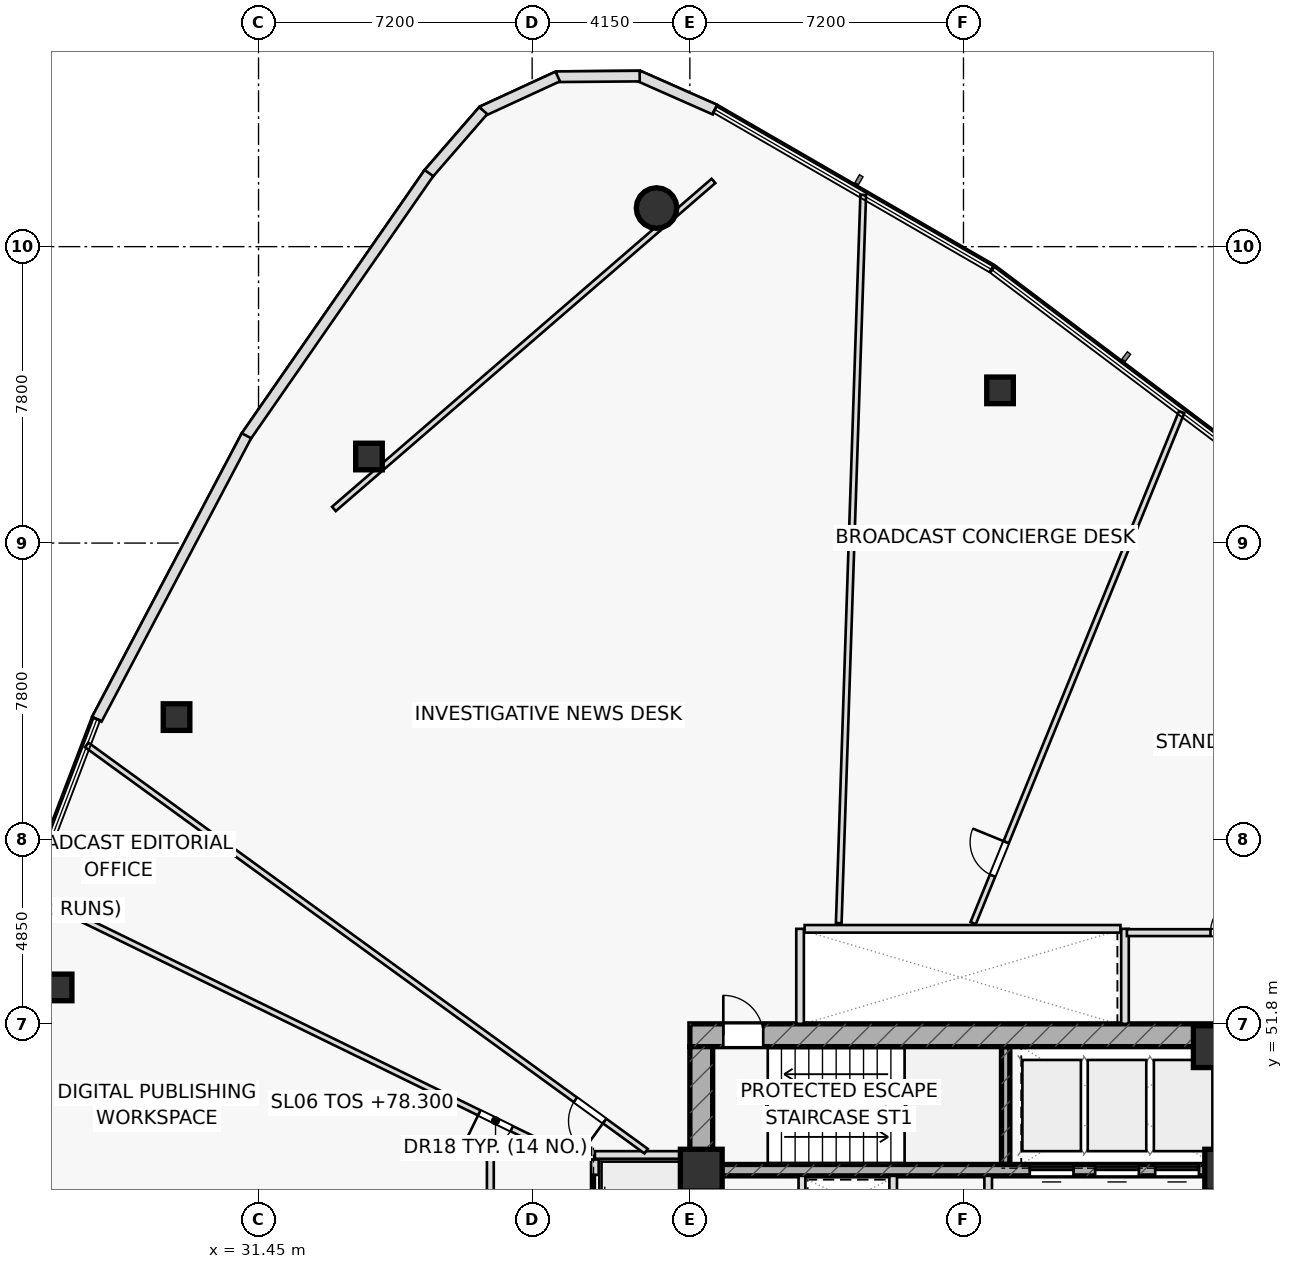
"""IFC4 building model, lengths in metres.
Left out: names, types, materials, properties, quantities, classifications, styles, units other than length and angle.
Written with IfcOpenShell. Run it as: python <this file> out.ifc"""

import sys

from ifc_helpers import new_model, si_unit, direction, frame, frame_2d, origin, origin_2d, place, context, subcontext, project, spatial, rectangle, hollow_rectangle, hollow_circle, extrude, element, fill, save


model = new_model("IFC4")
c1 = context("Model", 3, precision=1e-05, world=origin(), true_north=direction((0.0, 1.0)))
c2 = subcontext(c1, "Body", "Model", "MODEL_VIEW")
j1 = project(units=[si_unit("LENGTHUNIT", "METRE"), si_unit("PLANEANGLEUNIT", "RADIAN")], contexts=[c1])
p1 = place(None, origin())
s1 = spatial("IfcSite", under=j1, at=p1, CompositionType="ELEMENT")
p2 = place(p1, origin())
s2 = spatial("IfcBuilding", under=s1, at=p2, CompositionType="ELEMENT")
p3 = place(p2, frame((0.0, 0.0, 78.3)))
s3 = spatial("IfcBuildingStorey", under=s2, at=p3, CompositionType="ELEMENT", Elevation=78.3)
p4 = place(p3, frame((51.11, 48.1, 0.0), z_axis=(0.0, 0.0, 1.0), x_axis=(0.0, 1.0, 0.0)))
e1 = element("IfcWall", 1, at=p4, inside=s3, PredefinedType="SHEAR", context=c2, shape_type="SweptSolid", body=[
    extrude(rectangle(XDim=3.1, YDim=0.22, at=frame_2d((1.55, 0.0))), origin(), (0.0, 0.0, 1.0), 3.6),
])
p5 = place(p3, frame((42.8, 51.5, 0.0), z_axis=(0.0, 0.0, 1.0), x_axis=(1.0, 0.0, 0.0)))
e2 = element("IfcWall", 2, at=p5, inside=s3, PredefinedType="SHEAR", context=c2, shape_type="SweptSolid", body=[
    extrude(rectangle(XDim=14.4, YDim=0.6, at=frame_2d((7.2, 0.0))), origin(), (0.0, 0.0, 1.0), 3.6),
])
p6 = place(p5, frame((0.88, 0.0, 0.0)))
e3 = element("IfcOpeningElement", 3, at=p6, cuts=e2, PredefinedType="OPENING", context=c2, shape_type="SweptSolid", body=[
    extrude(rectangle(XDim=1.05, YDim=2.2, at=frame_2d((0.525, 1.1))), frame((0.0, 0.31, 0.0), z_axis=(0.0, -1.0, 0.0), x_axis=(1.0, 0.0, 0.0)), (0.0, 0.0, 1.0), 0.62),
])
p7 = place(p3, frame((43.1, 38.8, 0.0), z_axis=(0.0, 0.0, 1.0), x_axis=(0.0, 1.0, 0.0)))
e4 = element("IfcWall", 4, at=p7, inside=s3, PredefinedType="SHEAR", context=c2, shape_type="SweptSolid", body=[
    extrude(rectangle(XDim=12.4, YDim=0.6, at=frame_2d((6.2, 0.0))), origin(), (0.0, 0.0, 1.0), 3.6),
])
p8 = place(p3, frame((43.4, 47.95, 0.0), z_axis=(0.0, 0.0, 1.0), x_axis=(1.0, 0.0, 0.0)))
e5 = element("IfcWall", 5, at=p8, inside=s3, PredefinedType="SHEAR", context=c2, shape_type="SweptSolid", body=[
    extrude(rectangle(XDim=13.2, YDim=0.3, at=frame_2d((6.6, 0.0))), origin(), (0.0, 0.0, 1.0), 3.6),
])
p9 = place(p8, frame((8.345, 0.0, 0.0)))
e6 = element("IfcOpeningElement", 6, at=p9, cuts=e5, PredefinedType="OPENING", context=c2, shape_type="SweptSolid", body=[
    extrude(rectangle(XDim=1.15, YDim=2.2, at=frame_2d((0.575, 1.1))), frame((0.0, 0.16, 0.0), z_axis=(0.0, -1.0, 0.0), x_axis=(1.0, 0.0, 0.0)), (0.0, 0.0, 1.0), 0.32),
])
p10 = place(p8, frame((10.065, 0.0, 0.0)))
e7 = element("IfcOpeningElement", 7, at=p10, cuts=e5, PredefinedType="OPENING", context=c2, shape_type="SweptSolid", body=[
    extrude(rectangle(XDim=1.15, YDim=2.2, at=frame_2d((0.575, 1.1))), frame((0.0, 0.16, 0.0), z_axis=(0.0, -1.0, 0.0), x_axis=(1.0, 0.0, 0.0)), (0.0, 0.0, 1.0), 0.32),
])
p11 = place(p8, frame((11.645, 0.0, 0.0)))
e8 = element("IfcOpeningElement", 8, at=p11, cuts=e5, PredefinedType="OPENING", context=c2, shape_type="SweptSolid", body=[
    extrude(rectangle(XDim=1.15, YDim=2.2, at=frame_2d((0.575, 1.1))), frame((0.0, 0.16, 0.0), z_axis=(0.0, -1.0, 0.0), x_axis=(1.0, 0.0, 0.0)), (0.0, 0.0, 1.0), 0.32),
])
for number, where, z_axis, x_axis in (
    (9, (43.1, 47.95, 0.0), (0.0, 0.0, 1.0), (1.0, 0.0, 0.0)),
    (10, (56.9, 47.95, 0.0), (0.0, 0.0, 1.0), (1.0, 0.0, 0.0)),
    (11, (56.6, 51.2, 0.0), (0.0, 0.0, 1.0), (1.0, 0.0, 0.0)),
):
    element("IfcColumn", number, at=place(p3, frame(where, z_axis=z_axis, x_axis=x_axis)), inside=s3, PredefinedType="COLUMN", context=c2, shape_type="SweptSolid", body=[
        extrude(rectangle(XDim=1.1, YDim=1.1, at=origin_2d()), origin(), (0.0, 0.0, 1.0), 3.6),
    ])
p12 = place(p3, frame((41.923, 73.266, 0.0), z_axis=(0.0, 0.0, 1.0), x_axis=(1.0, 0.0, 0.0)))
e12 = element("IfcColumn", 12, at=p12, inside=s3, PredefinedType="COLUMN", context=c2, shape_type="SweptSolid", body=[
    extrude(hollow_circle(Radius=0.533, WallThickness=0.045, at=origin_2d()), origin(), (0.0, 0.0, 1.0), 3.6),
])
for number, where, z_axis, x_axis in (
    (13, (34.356, 66.728, 0.0), (0.0, 0.0, 1.0), (1.0, 0.0, 0.0)),
    (14, (29.292, 59.872, 0.0), (0.0, 0.0, 1.0), (1.0, 0.0, 0.0)),
    (15, (26.189, 52.758, 0.0), (0.0, 0.0, 1.0), (1.0, 0.0, 0.0)),
    (16, (50.962, 68.469, 0.0), (0.0, 0.0, 1.0), (1.0, 0.0, 0.0)),
):
    element("IfcColumn", number, at=place(p3, frame(where, z_axis=z_axis, x_axis=x_axis)), inside=s3, PredefinedType="COLUMN", context=c2, shape_type="SweptSolid", body=[
        extrude(hollow_rectangle(XDim=0.7, YDim=0.7, WallThickness=0.04, at=origin_2d()), origin(), (0.0, 0.0, 1.0), 3.6),
    ])
for number, where, z_axis, x_axis in (
    (17, (40.3, 48.35, 0.0), (0.0, 0.0, 1.0), (1.0, 0.0, 0.0)),
    (18, (45.7, 51.8, 0.0), (0.0, 0.0, 1.0), (0.0, 1.0, 0.0)),
    (19, (54.25, 51.8, 0.0), (0.0, 0.0, 1.0), (0.0, 1.0, 0.0)),
):
    element("IfcWall", number, at=place(p3, frame(where, z_axis=z_axis, x_axis=x_axis)), inside=s3, PredefinedType="PARTITIONING", context=c2, shape_type="SweptSolid", body=[
        extrude(rectangle(XDim=2.5, YDim=0.2, at=frame_2d((1.25, 0.0))), origin(), (0.0, 0.0, 1.0), 3.6),
    ])
p13 = place(p3, frame((48.15, 46.55, 0.0), z_axis=(0.0, 0.0, 1.0), x_axis=(0.0, 1.0, 0.0)))
e20 = element("IfcWall", 20, at=p13, inside=s3, PredefinedType="PARTITIONING", context=c2, shape_type="SweptSolid", body=[
    extrude(rectangle(XDim=1.25, YDim=0.2, at=frame_2d((0.625, 0.0))), origin(), (0.0, 0.0, 1.0), 3.6),
])
p14 = place(p3, frame((50.65, 45.05, 0.0), z_axis=(0.0, 0.0, 1.0), x_axis=(0.0, 1.0, 0.0)))
e21 = element("IfcWall", 21, at=p14, inside=s3, PredefinedType="PARTITIONING", context=c2, shape_type="SweptSolid", body=[
    extrude(rectangle(XDim=2.75, YDim=0.2, at=frame_2d((1.375, 0.0))), origin(), (0.0, 0.0, 1.0), 3.6),
])
p15 = place(p3, frame((45.75, 42.2, 0.0), z_axis=(0.0, 0.0, 1.0), x_axis=(0.0, 1.0, 0.0)))
e22 = element("IfcWall", 22, at=p15, inside=s3, PredefinedType="PARTITIONING", context=c2, shape_type="SweptSolid", body=[
    extrude(rectangle(XDim=5.6, YDim=0.18, at=frame_2d((2.8, 0.0))), origin(), (0.0, 0.0, 1.0), 3.6),
])
p16 = place(p15, frame((0.55, 0.0, 0.0)))
e23 = element("IfcOpeningElement", 23, at=p16, cuts=e22, PredefinedType="OPENING", context=c2, shape_type="SweptSolid", body=[
    extrude(rectangle(XDim=0.9, YDim=2.05, at=frame_2d((0.45, 1.025))), frame((0.0, 0.1, 0.0), z_axis=(0.0, -1.0, 0.0), x_axis=(1.0, 0.0, 0.0)), (0.0, 0.0, 1.0), 0.2),
])
p17 = place(p15, frame((2.9, 0.0, 0.0)))
e24 = element("IfcOpeningElement", 24, at=p17, cuts=e22, PredefinedType="OPENING", context=c2, shape_type="SweptSolid", body=[
    extrude(rectangle(XDim=0.85, YDim=2.05, at=frame_2d((0.425, 1.025))), frame((0.0, 0.1, 0.0), z_axis=(0.0, -1.0, 0.0), x_axis=(1.0, 0.0, 0.0)), (0.0, 0.0, 1.0), 0.2),
])
p18 = place(p3, frame((43.421, 73.979, 0.0), z_axis=(0.0, 0.0, 1.0), x_axis=(-0.756659135409, -0.653809569218, 0.0)))
e25 = element("IfcWall", 25, at=p18, inside=s3, PredefinedType="PARTITIONING", context=c2, shape_type="SweptSolid", body=[
    extrude(rectangle(XDim=13.2, YDim=0.15, at=frame_2d((6.6, 0.0))), origin(), (0.0, 0.0, 1.0), 2.975),
])
p19 = place(p3, frame((39.326, 48.45, 0.0), z_axis=(0.0, 0.0, 1.0), x_axis=(-0.898790760356, 0.438377883907, 0.0)))
e26 = element("IfcWall", 26, at=p19, inside=s3, PredefinedType="PARTITIONING", context=c2, shape_type="SweptSolid", body=[
    extrude(rectangle(XDim=15.456, YDim=0.15, at=frame_2d((7.728, 0.0))), origin(), (0.0, 0.0, 1.0), 2.975),
])
p20 = place(p19, frame((1.35, 0.0, 0.0)))
e27 = element("IfcOpeningElement", 27, at=p20, cuts=e26, PredefinedType="OPENING", context=c2, shape_type="SweptSolid", body=[
    extrude(rectangle(XDim=0.95, YDim=2.05, at=frame_2d((0.475, 1.025))), frame((0.0, 0.085, 0.0), z_axis=(0.0, -1.0, 0.0), x_axis=(1.0, 0.0, 0.0)), (0.0, 0.0, 1.0), 0.17),
])
p21 = place(p3, frame((50.255, 54.45, 0.0), z_axis=(0.0, 0.0, 1.0), x_axis=(0.377744353623, 0.92590993261, 0.0)))
e28 = element("IfcWall", 28, at=p21, inside=s3, PredefinedType="PARTITIONING", context=c2, shape_type="SweptSolid", body=[
    extrude(rectangle(XDim=14.522, YDim=0.15, at=frame_2d((7.261, 0.0))), origin(), (0.0, 0.0, 1.0), 2.975),
])
p22 = place(p21, frame((1.35, 0.0, 0.0)))
e29 = element("IfcOpeningElement", 29, at=p22, cuts=e28, PredefinedType="OPENING", context=c2, shape_type="SweptSolid", body=[
    extrude(rectangle(XDim=0.95, YDim=2.05, at=frame_2d((0.475, 1.025))), frame((0.0, 0.085, 0.0), z_axis=(0.0, -1.0, 0.0), x_axis=(1.0, 0.0, 0.0)), (0.0, 0.0, 1.0), 0.17),
])
p23 = place(p3, frame((46.718, 54.45, 0.0), z_axis=(0.0, 0.0, 1.0), x_axis=(0.033591693119, 0.999435639825, 0.0)))
e30 = element("IfcWall", 30, at=p23, inside=s3, PredefinedType="PARTITIONING", context=c2, shape_type="SweptSolid", body=[
    extrude(rectangle(XDim=19.173, YDim=0.15, at=frame_2d((9.586, 0.0))), origin(), (0.0, 0.0, 1.0), 3.025),
])
p24 = place(p3, frame((41.649, 48.45, 0.0), z_axis=(0.0, 0.0, 1.0), x_axis=(-0.809164130734, 0.587582683146, 0.0)))
e31 = element("IfcWall", 31, at=p24, inside=s3, PredefinedType="PARTITIONING", context=c2, shape_type="SweptSolid", body=[
    extrude(rectangle(XDim=18.193, YDim=0.15, at=frame_2d((9.097, 0.0))), origin(), (0.0, 0.0, 1.0), 2.975),
])
p25 = place(p24, frame((1.35, 0.0, 0.0)))
e32 = element("IfcOpeningElement", 32, at=p25, cuts=e31, PredefinedType="OPENING", context=c2, shape_type="SweptSolid", body=[
    extrude(rectangle(XDim=0.95, YDim=2.05, at=frame_2d((0.475, 1.025))), frame((0.0, 0.085, 0.0), z_axis=(0.0, -1.0, 0.0), x_axis=(1.0, 0.0, 0.0)), (0.0, 0.0, 1.0), 0.17),
])
p26 = place(p3, frame((54.3, 54.2, 0.0), z_axis=(0.0, 0.0, 1.0), x_axis=(1.0, 0.0, 0.0)))
e33 = element("IfcWall", 33, at=p26, inside=s3, PredefinedType="PARTITIONING", context=c2, shape_type="SweptSolid", body=[
    extrude(rectangle(XDim=5.35, YDim=0.18, at=frame_2d((2.675, 0.0))), origin(), (0.0, 0.0, 1.0), 2.975),
])
p27 = place(p26, frame((2.2, 0.0, 0.0)))
e34 = element("IfcOpeningElement", 34, at=p27, cuts=e33, PredefinedType="OPENING", context=c2, shape_type="SweptSolid", body=[
    extrude(rectangle(XDim=0.95, YDim=2.05, at=frame_2d((0.475, 1.025))), frame((0.0, 0.1, 0.0), z_axis=(0.0, -1.0, 0.0), x_axis=(1.0, 0.0, 0.0)), (0.0, 0.0, 1.0), 0.2),
])
p28 = place(p3, frame((37.55, 35.75, 0.0), z_axis=(0.0, 0.0, 1.0), x_axis=(0.0, 1.0, 0.0)))
e35 = element("IfcWall", 35, at=p28, inside=s3, PredefinedType="PARTITIONING", context=c2, shape_type="SweptSolid", body=[
    extrude(rectangle(XDim=12.75, YDim=0.18, at=frame_2d((6.375, 0.0))), origin(), (0.0, 0.0, 1.0), 2.975),
])
p29 = place(p28, frame((3.417, 0.0, 0.0)))
e36 = element("IfcOpeningElement", 36, at=p29, cuts=e35, PredefinedType="OPENING", context=c2, shape_type="SweptSolid", body=[
    extrude(rectangle(XDim=0.95, YDim=2.05, at=frame_2d((0.475, 1.025))), frame((0.0, 0.1, 0.0), z_axis=(0.0, -1.0, 0.0), x_axis=(1.0, 0.0, 0.0)), (0.0, 0.0, 1.0), 0.2),
])
p30 = place(p28, frame((8.205, 0.0, 0.0)))
e37 = element("IfcOpeningElement", 37, at=p30, cuts=e35, PredefinedType="OPENING", context=c2, shape_type="SweptSolid", body=[
    extrude(rectangle(XDim=0.95, YDim=2.05, at=frame_2d((0.475, 1.025))), frame((0.0, 0.1, 0.0), z_axis=(0.0, -1.0, 0.0), x_axis=(1.0, 0.0, 0.0)), (0.0, 0.0, 1.0), 0.2),
])
p31 = place(p28, frame((10.687, 0.0, 0.0)))
e38 = element("IfcOpeningElement", 38, at=p31, cuts=e35, PredefinedType="OPENING", context=c2, shape_type="SweptSolid", body=[
    extrude(rectangle(XDim=0.95, YDim=2.05, at=frame_2d((0.475, 1.025))), frame((0.0, 0.1, 0.0), z_axis=(0.0, -1.0, 0.0), x_axis=(1.0, 0.0, 0.0)), (0.0, 0.0, 1.0), 0.2),
])
p32 = place(p3, frame((37.5, 48.45, 0.0), z_axis=(0.0, 0.0, 1.0), x_axis=(1.0, 0.0, 0.0)))
e39 = element("IfcWall", 39, at=p32, inside=s3, PredefinedType="PARTITIONING", context=c2, shape_type="SweptSolid", body=[
    extrude(rectangle(XDim=2.7, YDim=0.18, at=frame_2d((1.35, 0.0))), origin(), (0.0, 0.0, 1.0), 3.6),
])
p33 = place(p3, frame((43.46, 75.856, 0.0), z_axis=(0.0, 0.0, 1.0), x_axis=(-0.914607276656, 0.404343331203, 0.0)))
e40 = element("IfcWall", 40, at=p33, inside=s3, PredefinedType="STANDARD", context=c2, shape_type="SweptSolid", body=[
    extrude(rectangle(XDim=2.197, YDim=0.28, at=frame_2d((1.098, 0.0))), origin(), (0.0, 0.0, 1.0), 3.6),
])
p34 = place(p3, frame((41.479, 76.738, 0.0), z_axis=(0.0, 0.0, 1.0), x_axis=(-0.999968535551, -0.007932711288, 0.0)))
e41 = element("IfcWall", 41, at=p34, inside=s3, PredefinedType="STANDARD", context=c2, shape_type="SweptSolid", body=[
    extrude(rectangle(XDim=2.185, YDim=0.28, at=frame_2d((1.093, 0.0))), origin(), (0.0, 0.0, 1.0), 3.6),
])
p35 = place(p3, frame((39.323, 76.727, 0.0), z_axis=(0.0, 0.0, 1.0), x_axis=(-0.908126107748, -0.418696754735, 0.0)))
e42 = element("IfcWall", 42, at=p35, inside=s3, PredefinedType="STANDARD", context=c2, shape_type="SweptSolid", body=[
    extrude(rectangle(XDim=2.185, YDim=0.28, at=frame_2d((1.092, 0.0))), origin(), (0.0, 0.0, 1.0), 3.6),
])
p36 = place(p3, frame((37.362, 75.83, 0.0), z_axis=(0.0, 0.0, 1.0), x_axis=(-0.655351461556, -0.755324077358, 0.0)))
e43 = element("IfcWall", 43, at=p36, inside=s3, PredefinedType="STANDARD", context=c2, shape_type="SweptSolid", body=[
    extrude(rectangle(XDim=2.208, YDim=0.28, at=frame_2d((1.104, 0.0))), origin(), (0.0, 0.0, 1.0), 3.6),
])
p37 = place(p3, frame((35.934, 74.186, 0.0), z_axis=(0.0, 0.0, 1.0), x_axis=(-0.570377390301, -0.821382756475, 0.0)))
e44 = element("IfcWall", 44, at=p37, inside=s3, PredefinedType="STANDARD", context=c2, shape_type="SweptSolid", body=[
    extrude(rectangle(XDim=8.446, YDim=0.28, at=frame_2d((4.223, 0.0))), origin(), (0.0, 0.0, 1.0), 3.6),
])
p38 = place(p3, frame((31.132, 67.275, 0.0), z_axis=(0.0, 0.0, 1.0), x_axis=(-0.466778115756, -0.884374462912, 0.0)))
e45 = element("IfcWall", 45, at=p38, inside=s3, PredefinedType="STANDARD", context=c2, shape_type="SweptSolid", body=[
    extrude(rectangle(XDim=8.434, YDim=0.28, at=frame_2d((4.217, 0.0))), origin(), (0.0, 0.0, 1.0), 3.6),
])
p39 = place(p3, frame((40.3, 40.02, 0.0), z_axis=(0.0, 0.0, 1.0), x_axis=(0.0, 1.0, 0.0)))
e46 = element("IfcWall", 46, at=p39, inside=s3, PredefinedType="PARTITIONING", context=c2, shape_type="SweptSolid", body=[
    extrude(rectangle(XDim=8.21, YDim=0.2, at=frame_2d((4.105, 0.0))), origin(), (0.0, 0.0, 1.0), 3.6),
])
p40 = place(p39, frame((0.405, 0.0, 0.0)))
e47 = element("IfcOpeningElement", 47, at=p40, cuts=e46, PredefinedType="OPENING", context=c2, shape_type="SweptSolid", body=[
    extrude(rectangle(XDim=1.1, YDim=2.15, at=frame_2d((0.55, 1.075))), frame((0.0, 0.11, 0.0), z_axis=(0.0, -1.0, 0.0), x_axis=(1.0, 0.0, 0.0)), (0.0, 0.0, 1.0), 0.22),
])
p41 = place(p39, frame((2.505, 0.0, 0.0)))
e48 = element("IfcOpeningElement", 48, at=p41, cuts=e46, PredefinedType="OPENING", context=c2, shape_type="SweptSolid", body=[
    extrude(rectangle(XDim=1.1, YDim=2.15, at=frame_2d((0.55, 1.075))), frame((0.0, 0.11, 0.0), z_axis=(0.0, -1.0, 0.0), x_axis=(1.0, 0.0, 0.0)), (0.0, 0.0, 1.0), 0.22),
])
p42 = place(p39, frame((4.605, 0.0, 0.0)))
e49 = element("IfcOpeningElement", 49, at=p42, cuts=e46, PredefinedType="OPENING", context=c2, shape_type="SweptSolid", body=[
    extrude(rectangle(XDim=1.1, YDim=2.15, at=frame_2d((0.55, 1.075))), frame((0.0, 0.11, 0.0), z_axis=(0.0, -1.0, 0.0), x_axis=(1.0, 0.0, 0.0)), (0.0, 0.0, 1.0), 0.22),
])
p43 = place(p39, frame((6.705, 0.0, 0.0)))
e50 = element("IfcOpeningElement", 50, at=p43, cuts=e46, PredefinedType="OPENING", context=c2, shape_type="SweptSolid", body=[
    extrude(rectangle(XDim=1.1, YDim=2.15, at=frame_2d((0.55, 1.075))), frame((0.0, 0.11, 0.0), z_axis=(0.0, -1.0, 0.0), x_axis=(1.0, 0.0, 0.0)), (0.0, 0.0, 1.0), 0.22),
])
p44 = place(p3, frame((45.82, 54.3, 0.0), z_axis=(0.0, 0.0, 1.0), x_axis=(1.0, 0.0, 0.0)))
e51 = element("IfcWall", 51, at=p44, inside=s3, PredefinedType="PARTITIONING", context=c2, shape_type="SweptSolid", body=[
    extrude(rectangle(XDim=8.31, YDim=0.2, at=frame_2d((4.155, 0.0))), origin(), (0.0, 0.0, 1.0), 3.6),
])
p45 = place(p6, origin())
e52 = element("IfcDoor", 52, at=p45, inside=s3, OperationType="SINGLE_SWING_LEFT", PredefinedType="DOOR", context=c2, shape_type="SweptSolid", body=[
    extrude(rectangle(XDim=1.05, YDim=2.2, at=frame_2d((0.525, 1.1))), frame((0.0, 0.025, 0.0), z_axis=(0.0, -1.0, 0.0), x_axis=(1.0, 0.0, 0.0)), (0.0, 0.0, 1.0), 0.05),
])
fill(e3, e52)
p46 = place(p20, origin())
e53 = element("IfcDoor", 53, at=p46, inside=s3, OperationType="SINGLE_SWING_RIGHT", PredefinedType="DOOR", context=c2, shape_type="SweptSolid", body=[
    extrude(rectangle(XDim=0.95, YDim=2.05, at=frame_2d((0.475, 1.025))), frame((0.0, 0.025, 0.0), z_axis=(0.0, -1.0, 0.0), x_axis=(1.0, 0.0, 0.0)), (0.0, 0.0, 1.0), 0.05),
])
fill(e27, e53)
p47 = place(p22, origin())
e54 = element("IfcDoor", 54, at=p47, inside=s3, OperationType="SINGLE_SWING_RIGHT", PredefinedType="DOOR", context=c2, shape_type="SweptSolid", body=[
    extrude(rectangle(XDim=0.95, YDim=2.05, at=frame_2d((0.475, 1.025))), frame((0.0, 0.025, 0.0), z_axis=(0.0, -1.0, 0.0), x_axis=(1.0, 0.0, 0.0)), (0.0, 0.0, 1.0), 0.05),
])
fill(e29, e54)
p48 = place(p25, origin())
e55 = element("IfcDoor", 55, at=p48, inside=s3, OperationType="SINGLE_SWING_LEFT", PredefinedType="DOOR", context=c2, shape_type="SweptSolid", body=[
    extrude(rectangle(XDim=0.95, YDim=2.05, at=frame_2d((0.475, 1.025))), frame((0.0, 0.025, 0.0), z_axis=(0.0, -1.0, 0.0), x_axis=(1.0, 0.0, 0.0)), (0.0, 0.0, 1.0), 0.05),
])
fill(e32, e55)
p49 = place(p27, origin())
e56 = element("IfcDoor", 56, at=p49, inside=s3, OperationType="SINGLE_SWING_RIGHT", PredefinedType="DOOR", context=c2, shape_type="SweptSolid", body=[
    extrude(rectangle(XDim=0.95, YDim=2.05, at=frame_2d((0.475, 1.025))), frame((0.0, 0.025, 0.0), z_axis=(0.0, -1.0, 0.0), x_axis=(1.0, 0.0, 0.0)), (0.0, 0.0, 1.0), 0.05),
])
fill(e34, e56)
p50 = place(p9, origin())
e57 = element("IfcDoor", 57, at=p50, inside=s3, OperationType="SLIDING_TO_LEFT", PredefinedType="DOOR", context=c2, shape_type="SweptSolid", body=[
    extrude(rectangle(XDim=1.15, YDim=2.2, at=frame_2d((0.575, 1.1))), frame((0.0, 0.025, 0.0), z_axis=(0.0, -1.0, 0.0), x_axis=(1.0, 0.0, 0.0)), (0.0, 0.0, 1.0), 0.05),
])
fill(e6, e57)
p51 = place(p10, origin())
e58 = element("IfcDoor", 58, at=p51, inside=s3, OperationType="SLIDING_TO_LEFT", PredefinedType="DOOR", context=c2, shape_type="SweptSolid", body=[
    extrude(rectangle(XDim=1.15, YDim=2.2, at=frame_2d((0.575, 1.1))), frame((0.0, 0.025, 0.0), z_axis=(0.0, -1.0, 0.0), x_axis=(1.0, 0.0, 0.0)), (0.0, 0.0, 1.0), 0.05),
])
fill(e7, e58)
p52 = place(p11, origin())
e59 = element("IfcDoor", 59, at=p52, inside=s3, OperationType="SLIDING_TO_LEFT", PredefinedType="DOOR", context=c2, shape_type="SweptSolid", body=[
    extrude(rectangle(XDim=1.15, YDim=2.2, at=frame_2d((0.575, 1.1))), frame((0.0, 0.025, 0.0), z_axis=(0.0, -1.0, 0.0), x_axis=(1.0, 0.0, 0.0)), (0.0, 0.0, 1.0), 0.05),
])
fill(e8, e59)
p53 = place(p43, origin())
e60 = element("IfcDoor", 60, at=p53, inside=s3, OperationType="SLIDING_TO_RIGHT", PredefinedType="DOOR", context=c2, shape_type="SweptSolid", body=[
    extrude(rectangle(XDim=1.1, YDim=2.15, at=frame_2d((0.55, 1.075))), frame((0.0, 0.025, 0.0), z_axis=(0.0, -1.0, 0.0), x_axis=(1.0, 0.0, 0.0)), (0.0, 0.0, 1.0), 0.05),
])
fill(e50, e60)
save(model, sys.argv[1])
